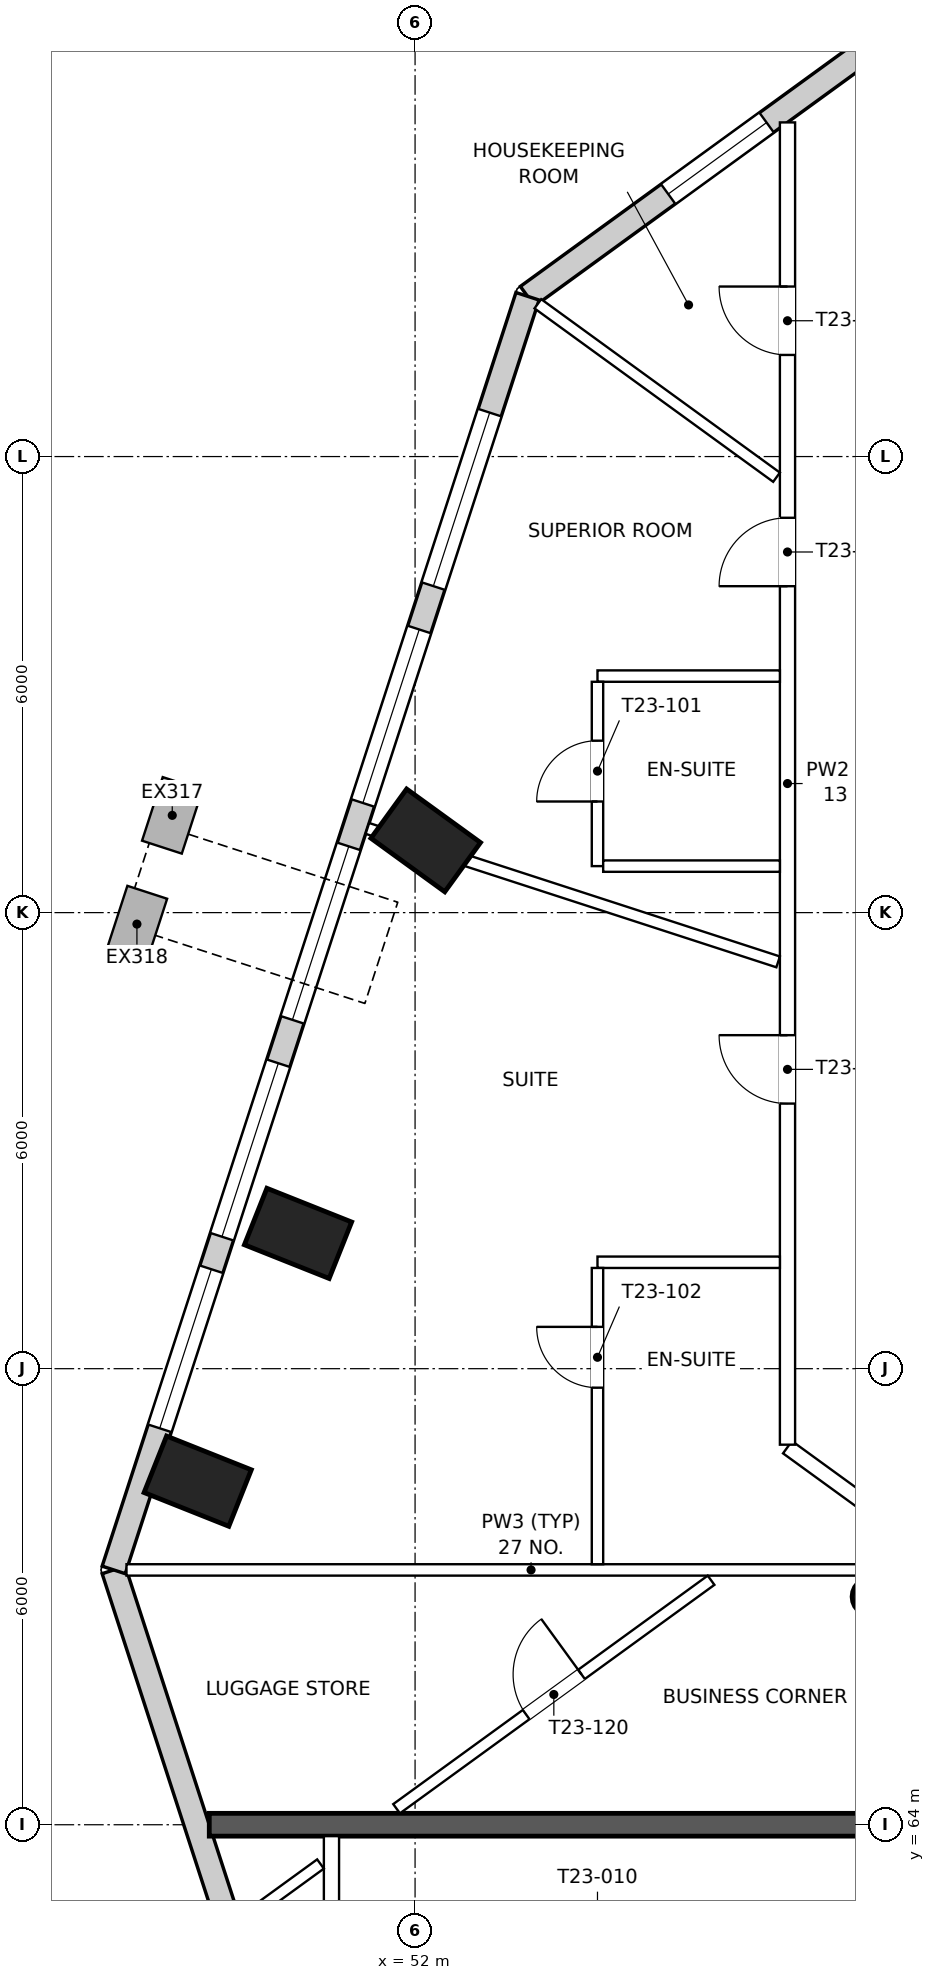
"""IFC4 building model, lengths in metres.
Left out: names, types, materials, properties, quantities, classifications, styles, units other than length and angle.
Written with IfcOpenShell. Run it as: python <this file> out.ifc"""

import sys

from ifc_helpers import new_model, si_unit, direction, frame, frame_2d, origin, origin_2d, place, context, subcontext, project, spatial, rectangle, circle, extrude, element, fill, save


model = new_model("IFC4")
c1 = context("Model", 3, precision=1e-05, world=origin(), true_north=direction((0.0, 1.0)))
c2 = subcontext(c1, "Body", "Model", "MODEL_VIEW")
j1 = project(units=[si_unit("LENGTHUNIT", "METRE"), si_unit("PLANEANGLEUNIT", "RADIAN")], contexts=[c1])
p1 = place(None, origin())
s1 = spatial("IfcSite", under=j1, at=p1, CompositionType="ELEMENT")
p2 = place(p1, origin())
s2 = spatial("IfcBuilding", under=s1, at=p2, CompositionType="ELEMENT")
p3 = place(p2, frame((0.0, 0.0, 317.8)))
s3 = spatial("IfcBuildingStorey", under=s2, at=p3, CompositionType="ELEMENT", Elevation=317.8)
for number, where, z_axis, x_axis in (
    (1, (52.14, 76.95, 0.0), (0.0, 0.0, 1.0), (0.587, 0.81, 0.0)),
    (2, (50.46, 71.78, 0.0), (0.0, 0.0, 1.0), (0.37, 0.929, 0.0)),
    (3, (49.14, 68.52, 0.0), (0.0, 0.0, 1.0), (0.37, 0.929, 0.0)),
):
    element("IfcColumn", number, at=place(p3, frame(where, z_axis=z_axis, x_axis=x_axis)), inside=s3, PredefinedType="COLUMN", context=c2, shape_type="SweptSolid", body=[
        extrude(rectangle(XDim=0.8, YDim=1.2, at=origin_2d()), origin(), (0.0, 0.0, 1.0), 3.9),
    ])
p4 = place(p3, frame((58.0, 67.0, 0.0), z_axis=(0.0, 0.0, 1.0), x_axis=(1.0, 0.0, 0.0)))
e4 = element("IfcColumn", 4, at=p4, inside=s3, PredefinedType="COLUMN", context=c2, shape_type="SweptSolid", body=[
    extrude(circle(Radius=0.25, at=origin_2d()), origin(), (0.0, 0.0, 1.0), 3.9),
])
p5 = place(p3, frame((48.035, 67.352, 0.0), z_axis=(0.0, 0.0, 1.0), x_axis=(0.309016131261, -0.951056796737, 0.0)))
e5 = element("IfcWall", 5, at=p5, inside=s3, PredefinedType="SOLIDWALL", context=c2, shape_type="SweptSolid", body=[
    extrude(rectangle(XDim=4.973, YDim=0.32, at=frame_2d((2.486, 0.0))), origin(), (0.0, 0.0, 1.0), 3.5),
])
p6 = place(p3, frame((58.615, 87.84, 0.0), z_axis=(0.0, 0.0, 1.0), x_axis=(-0.809013740323, -0.587789731084, 0.0)))
e6 = element("IfcWall", 6, at=p6, inside=s3, PredefinedType="SOLIDWALL", context=c2, shape_type="SweptSolid", body=[
    extrude(rectangle(XDim=6.348, YDim=0.32, at=frame_2d((3.174, 0.0))), origin(), (0.0, 0.0, 1.0), 3.5),
])
p7 = place(p6, frame((2.46, 0.0, 0.9)))
e7 = element("IfcOpeningElement", 7, at=p7, cuts=e6, PredefinedType="OPENING", context=c2, shape_type="SweptSolid", body=[
    extrude(rectangle(XDim=1.6, YDim=1.8, at=frame_2d((0.8, 0.9))), frame((0.0, 0.17, 0.0), z_axis=(0.0, -1.0, 0.0), x_axis=(1.0, 0.0, 0.0)), (0.0, 0.0, 1.0), 0.34),
])
p8 = place(p3, frame((53.479, 84.109, 0.0), z_axis=(0.0, 0.0, 1.0), x_axis=(-0.309018707068, -0.951055959806, 0.0)))
e8 = element("IfcWall", 8, at=p8, inside=s3, PredefinedType="SOLIDWALL", context=c2, shape_type="SweptSolid", body=[
    extrude(rectangle(XDim=17.619, YDim=0.32, at=frame_2d((8.81, 0.0))), origin(), (0.0, 0.0, 1.0), 3.5),
])
p9 = place(p8, frame((1.609, 0.0, 0.55)))
e9 = element("IfcOpeningElement", 9, at=p9, cuts=e8, PredefinedType="OPENING", context=c2, shape_type="SweptSolid", body=[
    extrude(rectangle(XDim=2.4, YDim=2.3, at=frame_2d((1.2, 1.15))), frame((0.0, 0.17, 0.0), z_axis=(0.0, -1.0, 0.0), x_axis=(1.0, 0.0, 0.0)), (0.0, 0.0, 1.0), 0.34),
])
p10 = place(p8, frame((4.609, 0.0, 0.55)))
e10 = element("IfcOpeningElement", 10, at=p10, cuts=e8, PredefinedType="OPENING", context=c2, shape_type="SweptSolid", body=[
    extrude(rectangle(XDim=2.4, YDim=2.3, at=frame_2d((1.2, 1.15))), frame((0.0, 0.17, 0.0), z_axis=(0.0, -1.0, 0.0), x_axis=(1.0, 0.0, 0.0)), (0.0, 0.0, 1.0), 0.34),
])
p11 = place(p8, frame((7.609, 0.0, 0.55)))
e11 = element("IfcOpeningElement", 11, at=p11, cuts=e8, PredefinedType="OPENING", context=c2, shape_type="SweptSolid", body=[
    extrude(rectangle(XDim=2.4, YDim=2.3, at=frame_2d((1.2, 1.15))), frame((0.0, 0.17, 0.0), z_axis=(0.0, -1.0, 0.0), x_axis=(1.0, 0.0, 0.0)), (0.0, 0.0, 1.0), 0.34),
])
p12 = place(p8, frame((10.609, 0.0, 0.55)))
e12 = element("IfcOpeningElement", 12, at=p12, cuts=e8, PredefinedType="OPENING", context=c2, shape_type="SweptSolid", body=[
    extrude(rectangle(XDim=2.4, YDim=2.3, at=frame_2d((1.2, 1.15))), frame((0.0, 0.17, 0.0), z_axis=(0.0, -1.0, 0.0), x_axis=(1.0, 0.0, 0.0)), (0.0, 0.0, 1.0), 0.34),
])
p13 = place(p8, frame((13.459, 0.0, 0.75)))
e13 = element("IfcOpeningElement", 13, at=p13, cuts=e8, PredefinedType="OPENING", context=c2, shape_type="SweptSolid", body=[
    extrude(rectangle(XDim=2.2, YDim=2.1, at=frame_2d((1.1, 1.05))), frame((0.0, 0.17, 0.0), z_axis=(0.0, -1.0, 0.0), x_axis=(1.0, 0.0, 0.0)), (0.0, 0.0, 1.0), 0.34),
])
p14 = place(p3, frame((49.292, 64.0, 0.0), z_axis=(0.0, 0.0, 1.0), x_axis=(1.0, 0.0, 0.0)))
e14 = element("IfcWall", 14, at=p14, inside=s3, PredefinedType="PARTITIONING", context=c2, shape_type="SweptSolid", body=[
    extrude(rectangle(XDim=41.415, YDim=0.3, at=frame_2d((20.708, 0.0))), origin(), (0.0, 0.0, 1.0), 3.0),
])
p15 = place(p14, frame((16.576, 0.0, 0.0)))
e15 = element("IfcOpeningElement", 15, at=p15, cuts=e14, PredefinedType="OPENING", context=c2, shape_type="SweptSolid", body=[
    extrude(rectangle(XDim=2.0, YDim=2.1, at=frame_2d((1.0, 1.05))), frame((0.0, 0.16, 0.0), z_axis=(0.0, -1.0, 0.0), x_axis=(1.0, 0.0, 0.0)), (0.0, 0.0, 1.0), 0.32),
])
p16 = place(p14, frame((22.839, 0.0, 0.0)))
e16 = element("IfcOpeningElement", 16, at=p16, cuts=e14, PredefinedType="OPENING", context=c2, shape_type="SweptSolid", body=[
    extrude(rectangle(XDim=2.0, YDim=2.1, at=frame_2d((1.0, 1.05))), frame((0.0, 0.16, 0.0), z_axis=(0.0, -1.0, 0.0), x_axis=(1.0, 0.0, 0.0)), (0.0, 0.0, 1.0), 0.32),
])
p17 = place(p3, frame((63.943, 63.85, 0.0), z_axis=(0.0, 0.0, 1.0), x_axis=(-0.809024626779, 0.587774747046, 0.0)))
e17 = element("IfcWall", 17, at=p17, inside=s3, PredefinedType="PARTITIONING", context=c2, shape_type="SweptSolid", body=[
    extrude(rectangle(XDim=8.705, YDim=0.2, at=frame_2d((4.353, 0.0))), origin(), (0.0, 0.0, 1.0), 3.5),
])
p18 = place(p17, frame((4.167, 0.0, 0.0)))
e18 = element("IfcOpeningElement", 18, at=p18, cuts=e17, PredefinedType="OPENING", context=c2, shape_type="SweptSolid", body=[
    extrude(rectangle(XDim=0.9, YDim=2.1, at=frame_2d((0.45, 1.05))), frame((0.0, 0.11, 0.0), z_axis=(0.0, -1.0, 0.0), x_axis=(1.0, 0.0, 0.0)), (0.0, 0.0, 1.0), 0.22),
])
p19 = place(p17, frame((1.279, 0.0, 0.0)))
e19 = element("IfcOpeningElement", 19, at=p19, cuts=e17, PredefinedType="OPENING", context=c2, shape_type="SweptSolid", body=[
    extrude(rectangle(XDim=0.9, YDim=2.1, at=frame_2d((0.45, 1.05))), frame((0.0, 0.11, 0.0), z_axis=(0.0, -1.0, 0.0), x_axis=(1.0, 0.0, 0.0)), (0.0, 0.0, 1.0), 0.22),
])
p20 = place(p3, frame((56.9, 69.0, 0.0), z_axis=(0.0, 0.0, 1.0), x_axis=(0.0, 1.0, 0.0)))
e20 = element("IfcWall", 20, at=p20, inside=s3, PredefinedType="PARTITIONING", context=c2, shape_type="SweptSolid", body=[
    extrude(rectangle(XDim=17.396, YDim=0.2, at=frame_2d((8.698, 0.0))), origin(), (0.0, 0.0, 1.0), 3.05),
])
p21 = place(p20, frame((4.488, 0.0, 0.0)))
e21 = element("IfcOpeningElement", 21, at=p21, cuts=e20, PredefinedType="OPENING", context=c2, shape_type="SweptSolid", body=[
    extrude(rectangle(XDim=0.9, YDim=2.1, at=frame_2d((0.45, 1.05))), frame((0.0, 0.11, 0.0), z_axis=(0.0, -1.0, 0.0), x_axis=(1.0, 0.0, 0.0)), (0.0, 0.0, 1.0), 0.22),
])
p22 = place(p20, frame((11.294, 0.0, 0.0)))
e22 = element("IfcOpeningElement", 22, at=p22, cuts=e20, PredefinedType="OPENING", context=c2, shape_type="SweptSolid", body=[
    extrude(rectangle(XDim=0.9, YDim=2.1, at=frame_2d((0.45, 1.05))), frame((0.0, 0.11, 0.0), z_axis=(0.0, -1.0, 0.0), x_axis=(1.0, 0.0, 0.0)), (0.0, 0.0, 1.0), 0.22),
])
p23 = place(p20, frame((14.337, 0.0, 0.0)))
e23 = element("IfcOpeningElement", 23, at=p23, cuts=e20, PredefinedType="OPENING", context=c2, shape_type="SweptSolid", body=[
    extrude(rectangle(XDim=0.9, YDim=2.1, at=frame_2d((0.45, 1.05))), frame((0.0, 0.11, 0.0), z_axis=(0.0, -1.0, 0.0), x_axis=(1.0, 0.0, 0.0)), (0.0, 0.0, 1.0), 0.22),
])
p24 = place(p3, frame((50.9, 61.855, 0.0), z_axis=(0.0, 0.0, 1.0), x_axis=(0.0, 1.0, 0.0)))
e24 = element("IfcWall", 24, at=p24, inside=s3, PredefinedType="PARTITIONING", context=c2, shape_type="SweptSolid", body=[
    extrude(rectangle(XDim=1.995, YDim=0.2, at=frame_2d((0.997, 0.0))), origin(), (0.0, 0.0, 1.0), 3.5),
])
p25 = place(p3, frame((53.615, 84.01, 0.0), z_axis=(0.0, 0.0, 1.0), x_axis=(0.809002534855, -0.5878051536, 0.0)))
e25 = element("IfcWall", 25, at=p25, inside=s3, PredefinedType="PARTITIONING", context=c2, shape_type="SweptSolid", body=[
    extrude(rectangle(XDim=3.882, YDim=0.15, at=frame_2d((1.941, 0.0))), origin(), (0.0, 0.0, 1.0), 3.5),
])
p26 = place(p3, frame((48.203, 67.352, 0.0), z_axis=(0.0, 0.0, 1.0), x_axis=(1.0, 0.0, 0.0)))
e26 = element("IfcWall", 26, at=p26, inside=s3, PredefinedType="PARTITIONING", context=c2, shape_type="SweptSolid", body=[
    extrude(rectangle(XDim=10.646, YDim=0.15, at=frame_2d((5.323, 0.0))), origin(), (0.0, 0.0, 1.0), 3.5),
])
p27 = place(p3, frame((49.708, 62.722, 0.0), z_axis=(0.0, 0.0, 1.0), x_axis=(0.808931599774, 0.587902769927, 0.0)))
e27 = element("IfcWall", 27, at=p27, inside=s3, PredefinedType="PARTITIONING", context=c2, shape_type="SweptSolid", body=[
    extrude(rectangle(XDim=1.296, YDim=0.15, at=frame_2d((0.648, 0.0))), origin(), (0.0, 0.0, 1.0), 3.5),
])
p28 = place(p3, frame((51.757, 64.211, 0.0), z_axis=(0.0, 0.0, 1.0), x_axis=(0.809010552393, 0.587794118818, 0.0)))
e28 = element("IfcWall", 28, at=p28, inside=s3, PredefinedType="PARTITIONING", context=c2, shape_type="SweptSolid", body=[
    extrude(rectangle(XDim=5.114, YDim=0.15, at=frame_2d((2.557, 0.0))), origin(), (0.0, 0.0, 1.0), 3.5),
])
p29 = place(p28, frame((2.107, 0.0, 0.0)))
e29 = element("IfcOpeningElement", 29, at=p29, cuts=e28, PredefinedType="OPENING", context=c2, shape_type="SweptSolid", body=[
    extrude(rectangle(XDim=0.9, YDim=2.1, at=frame_2d((0.45, 1.05))), frame((0.0, 0.085, 0.0), z_axis=(0.0, -1.0, 0.0), x_axis=(1.0, 0.0, 0.0)), (0.0, 0.0, 1.0), 0.17),
])
p30 = place(p3, frame((51.373, 77.108, 0.0), z_axis=(0.0, 0.0, 1.0), x_axis=(0.951057747163, -0.309013206126, 0.0)))
e30 = element("IfcWall", 30, at=p30, inside=s3, PredefinedType="PARTITIONING", context=c2, shape_type="SweptSolid", body=[
    extrude(rectangle(XDim=5.682, YDim=0.15, at=frame_2d((2.841, 0.0))), origin(), (0.0, 0.0, 1.0), 3.5),
])
p31 = place(p3, frame((56.8, 79.112, 0.0), z_axis=(0.0, 0.0, 1.0), x_axis=(-1.0, 0.0, 0.0)))
e31 = element("IfcWall", 31, at=p31, inside=s3, PredefinedType="PARTITIONING", context=c2, shape_type="SweptSolid", body=[
    extrude(rectangle(XDim=2.4, YDim=0.15, at=frame_2d((1.2, 0.0))), origin(), (0.0, 0.0, 1.0), 3.5),
])
p32 = place(p3, frame((54.4, 76.612, 0.0), z_axis=(0.0, 0.0, 1.0), x_axis=(0.0, 1.0, 0.0)))
e32 = element("IfcWall", 32, at=p32, inside=s3, PredefinedType="PARTITIONING", context=c2, shape_type="SweptSolid", body=[
    extrude(rectangle(XDim=2.425, YDim=0.15, at=frame_2d((1.212, 0.0))), origin(), (0.0, 0.0, 1.0), 3.05),
])
p33 = place(p32, frame((0.85, 0.0, 0.0)))
e33 = element("IfcOpeningElement", 33, at=p33, cuts=e32, PredefinedType="OPENING", context=c2, shape_type="SweptSolid", body=[
    extrude(rectangle(XDim=0.8, YDim=2.1, at=frame_2d((0.4, 1.05))), frame((0.0, 0.085, 0.0), z_axis=(0.0, -1.0, 0.0), x_axis=(1.0, 0.0, 0.0)), (0.0, 0.0, 1.0), 0.17),
])
p34 = place(p3, frame((56.8, 76.612, 0.0), z_axis=(0.0, 0.0, 1.0), x_axis=(-1.0, 0.0, 0.0)))
e34 = element("IfcWall", 34, at=p34, inside=s3, PredefinedType="PARTITIONING", context=c2, shape_type="SweptSolid", body=[
    extrude(rectangle(XDim=2.325, YDim=0.15, at=frame_2d((1.163, 0.0))), origin(), (0.0, 0.0, 1.0), 3.5),
])
p35 = place(p3, frame((56.8, 71.4, 0.0), z_axis=(0.0, 0.0, 1.0), x_axis=(-1.0, 0.0, 0.0)))
e35 = element("IfcWall", 35, at=p35, inside=s3, PredefinedType="PARTITIONING", context=c2, shape_type="SweptSolid", body=[
    extrude(rectangle(XDim=2.4, YDim=0.15, at=frame_2d((1.2, 0.0))), origin(), (0.0, 0.0, 1.0), 3.5),
])
p36 = place(p3, frame((54.4, 67.427, 0.0), z_axis=(0.0, 0.0, 1.0), x_axis=(0.0, 1.0, 0.0)))
e36 = element("IfcWall", 36, at=p36, inside=s3, PredefinedType="PARTITIONING", context=c2, shape_type="SweptSolid", body=[
    extrude(rectangle(XDim=3.897, YDim=0.15, at=frame_2d((1.949, 0.0))), origin(), (0.0, 0.0, 1.0), 3.5),
])
p37 = place(p36, frame((2.323, 0.0, 0.0)))
e37 = element("IfcOpeningElement", 37, at=p37, cuts=e36, PredefinedType="OPENING", context=c2, shape_type="SweptSolid", body=[
    extrude(rectangle(XDim=0.8, YDim=2.1, at=frame_2d((0.4, 1.05))), frame((0.0, 0.085, 0.0), z_axis=(0.0, -1.0, 0.0), x_axis=(1.0, 0.0, 0.0)), (0.0, 0.0, 1.0), 0.17),
])
p38 = place(p7, origin())
e38 = element("IfcWindow", 38, at=p38, inside=s3, PartitioningType="SINGLE_PANEL", PredefinedType="WINDOW", context=c2, shape_type="SweptSolid", body=[
    extrude(rectangle(XDim=1.6, YDim=1.8, at=frame_2d((0.8, 0.9))), frame((0.0, 0.07, 0.0), z_axis=(0.0, -1.0, 0.0), x_axis=(1.0, 0.0, 0.0)), (0.0, 0.0, 1.0), 0.06),
])
fill(e7, e38)
p39 = place(p9, origin())
e39 = element("IfcWindow", 39, at=p39, inside=s3, PartitioningType="SINGLE_PANEL", PredefinedType="WINDOW", context=c2, shape_type="SweptSolid", body=[
    extrude(rectangle(XDim=2.4, YDim=2.3, at=frame_2d((1.2, 1.15))), frame((0.0, 0.07, 0.0), z_axis=(0.0, -1.0, 0.0), x_axis=(1.0, 0.0, 0.0)), (0.0, 0.0, 1.0), 0.06),
])
fill(e9, e39)
p40 = place(p10, origin())
e40 = element("IfcWindow", 40, at=p40, inside=s3, PartitioningType="SINGLE_PANEL", PredefinedType="WINDOW", context=c2, shape_type="SweptSolid", body=[
    extrude(rectangle(XDim=2.4, YDim=2.3, at=frame_2d((1.2, 1.15))), frame((0.0, 0.07, 0.0), z_axis=(0.0, -1.0, 0.0), x_axis=(1.0, 0.0, 0.0)), (0.0, 0.0, 1.0), 0.06),
])
fill(e10, e40)
p41 = place(p11, origin())
e41 = element("IfcWindow", 41, at=p41, inside=s3, PartitioningType="SINGLE_PANEL", PredefinedType="WINDOW", context=c2, shape_type="SweptSolid", body=[
    extrude(rectangle(XDim=2.4, YDim=2.3, at=frame_2d((1.2, 1.15))), frame((0.0, 0.07, 0.0), z_axis=(0.0, -1.0, 0.0), x_axis=(1.0, 0.0, 0.0)), (0.0, 0.0, 1.0), 0.06),
])
fill(e11, e41)
p42 = place(p12, origin())
e42 = element("IfcWindow", 42, at=p42, inside=s3, PartitioningType="SINGLE_PANEL", PredefinedType="WINDOW", context=c2, shape_type="SweptSolid", body=[
    extrude(rectangle(XDim=2.4, YDim=2.3, at=frame_2d((1.2, 1.15))), frame((0.0, 0.07, 0.0), z_axis=(0.0, -1.0, 0.0), x_axis=(1.0, 0.0, 0.0)), (0.0, 0.0, 1.0), 0.06),
])
fill(e12, e42)
p43 = place(p13, origin())
e43 = element("IfcWindow", 43, at=p43, inside=s3, PartitioningType="SINGLE_PANEL", PredefinedType="WINDOW", context=c2, shape_type="SweptSolid", body=[
    extrude(rectangle(XDim=2.2, YDim=2.1, at=frame_2d((1.1, 1.05))), frame((0.0, 0.07, 0.0), z_axis=(0.0, -1.0, 0.0), x_axis=(1.0, 0.0, 0.0)), (0.0, 0.0, 1.0), 0.06),
])
fill(e13, e43)
p44 = place(p33, origin())
e44 = element("IfcDoor", 44, at=p44, inside=s3, OperationType="SINGLE_SWING_LEFT", PredefinedType="DOOR", context=c2, shape_type="SweptSolid", body=[
    extrude(rectangle(XDim=0.8, YDim=2.1, at=frame_2d((0.4, 1.05))), frame((0.0, 0.025, 0.0), z_axis=(0.0, -1.0, 0.0), x_axis=(1.0, 0.0, 0.0)), (0.0, 0.0, 1.0), 0.05),
])
fill(e33, e44)
p45 = place(p37, origin())
e45 = element("IfcDoor", 45, at=p45, inside=s3, OperationType="SINGLE_SWING_RIGHT", PredefinedType="DOOR", context=c2, shape_type="SweptSolid", body=[
    extrude(rectangle(XDim=0.8, YDim=2.1, at=frame_2d((0.4, 1.05))), frame((0.0, 0.025, 0.0), z_axis=(0.0, -1.0, 0.0), x_axis=(1.0, 0.0, 0.0)), (0.0, 0.0, 1.0), 0.05),
])
fill(e37, e45)
p46 = place(p21, origin())
e46 = element("IfcDoor", 46, at=p46, inside=s3, OperationType="SINGLE_SWING_RIGHT", PredefinedType="DOOR", context=c2, shape_type="SweptSolid", body=[
    extrude(rectangle(XDim=0.9, YDim=2.1, at=frame_2d((0.45, 1.05))), frame((0.0, 0.025, 0.0), z_axis=(0.0, -1.0, 0.0), x_axis=(1.0, 0.0, 0.0)), (0.0, 0.0, 1.0), 0.05),
])
fill(e21, e46)
p47 = place(p22, origin())
e47 = element("IfcDoor", 47, at=p47, inside=s3, OperationType="SINGLE_SWING_LEFT", PredefinedType="DOOR", context=c2, shape_type="SweptSolid", body=[
    extrude(rectangle(XDim=0.9, YDim=2.1, at=frame_2d((0.45, 1.05))), frame((0.0, 0.025, 0.0), z_axis=(0.0, -1.0, 0.0), x_axis=(1.0, 0.0, 0.0)), (0.0, 0.0, 1.0), 0.05),
])
fill(e22, e47)
p48 = place(p23, origin())
e48 = element("IfcDoor", 48, at=p48, inside=s3, OperationType="SINGLE_SWING_RIGHT", PredefinedType="DOOR", context=c2, shape_type="SweptSolid", body=[
    extrude(rectangle(XDim=0.9, YDim=2.1, at=frame_2d((0.45, 1.05))), frame((0.0, 0.025, 0.0), z_axis=(0.0, -1.0, 0.0), x_axis=(1.0, 0.0, 0.0)), (0.0, 0.0, 1.0), 0.05),
])
fill(e23, e48)
p49 = place(p29, origin())
e49 = element("IfcDoor", 49, at=p49, inside=s3, OperationType="SINGLE_SWING_RIGHT", PredefinedType="DOOR", context=c2, shape_type="SweptSolid", body=[
    extrude(rectangle(XDim=0.9, YDim=2.1, at=frame_2d((0.45, 1.05))), frame((0.0, 0.025, 0.0), z_axis=(0.0, -1.0, 0.0), x_axis=(1.0, 0.0, 0.0)), (0.0, 0.0, 1.0), 0.05),
])
fill(e29, e49)
save(model, sys.argv[1])
